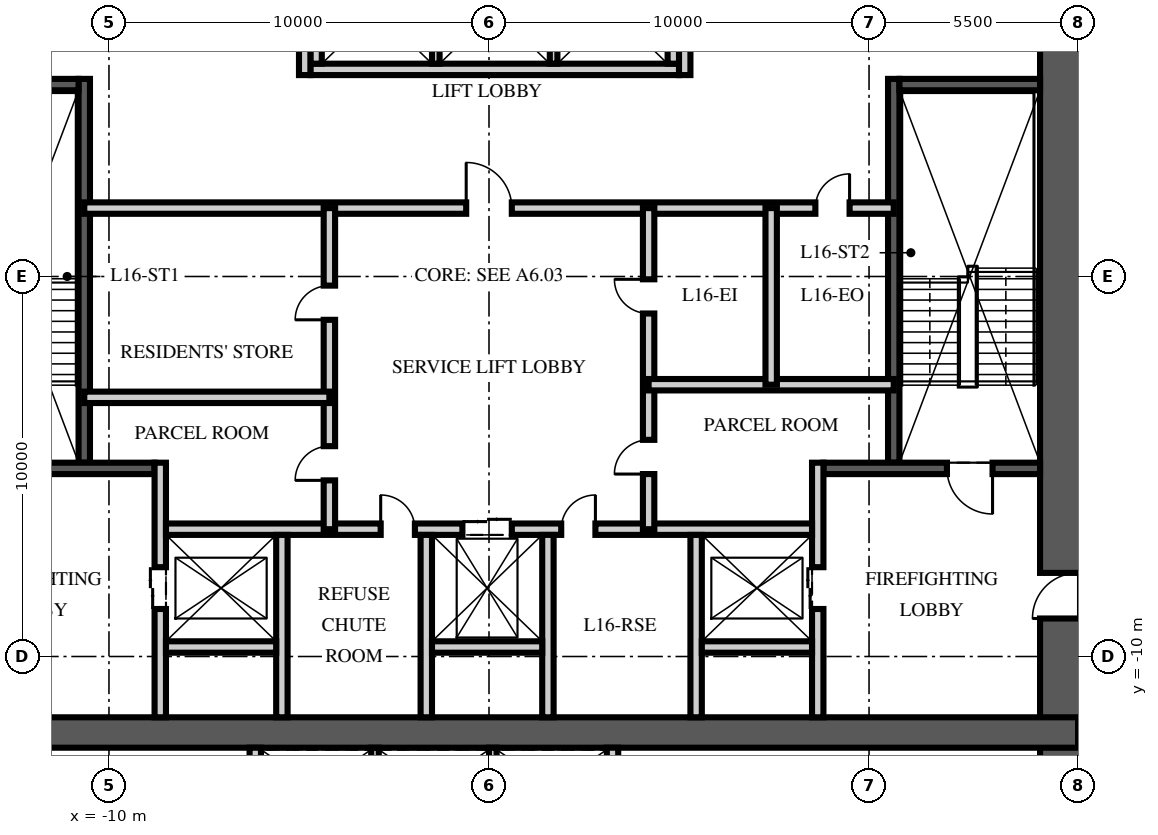
"""IFC4 building model, lengths in metres.
Left out: names, types, materials, properties, quantities, classifications, styles, units other than length and angle.
Written with IfcOpenShell. Run it as: python <this file> out.ifc"""

import sys

from ifc_helpers import new_model, si_unit, direction, frame, frame_2d, origin, place, context, subcontext, project, spatial, rectangle, extrude, element, fill, save


model = new_model("IFC4")
c1 = context("Model", 3, precision=1e-05, world=origin(), true_north=direction((0.0, 1.0)))
c2 = subcontext(c1, "Body", "Model", "MODEL_VIEW")
j1 = project(units=[si_unit("LENGTHUNIT", "METRE"), si_unit("PLANEANGLEUNIT", "RADIAN")], contexts=[c1])
p1 = place(None, origin())
s1 = spatial("IfcSite", under=j1, at=p1, CompositionType="ELEMENT")
p2 = place(p1, origin())
s2 = spatial("IfcBuilding", under=s1, at=p2, CompositionType="ELEMENT")
p3 = place(p2, frame((0.0, 0.0, 66.0)))
s3 = spatial("IfcBuildingStorey", under=s2, at=p3, CompositionType="ELEMENT", Elevation=66.0)
p4 = place(p3, frame((15.5, -15.5, -0.25), z_axis=(0.0, 0.0, 1.0), x_axis=(0.0, 1.0, 0.0)))
e1 = element("IfcWall", 1, at=p4, inside=s3, PredefinedType="SHEAR", context=c2, shape_type="SweptSolid", body=[
    extrude(rectangle(XDim=31.0, YDim=2.0, at=frame_2d((15.5, 0.0))), origin(), (0.0, 0.0, 1.0), 3.75),
])
p5 = place(p4, frame((6.5, 0.0, 0.25)))
e2 = element("IfcOpeningElement", 2, at=p5, cuts=e1, PredefinedType="OPENING", context=c2, shape_type="SweptSolid", body=[
    extrude(rectangle(XDim=1.2, YDim=2.1, at=frame_2d((0.6, 1.05))), frame((0.0, 1.01, 0.0), z_axis=(0.0, -1.0, 0.0), x_axis=(1.0, 0.0, 0.0)), (0.0, 0.0, 1.0), 2.02),
])
p6 = place(p4, frame((23.0, 0.0, 0.25)))
e3 = element("IfcOpeningElement", 3, at=p6, cuts=e1, PredefinedType="OPENING", context=c2, shape_type="SweptSolid", body=[
    extrude(rectangle(XDim=1.8, YDim=2.1, at=frame_2d((0.9, 1.05))), frame((0.0, 1.01, 0.0), z_axis=(0.0, -1.0, 0.0), x_axis=(1.0, 0.0, 0.0)), (0.0, 0.0, 1.0), 2.02),
])
p7 = place(p3, frame((-15.5, -12.0, -0.25), z_axis=(0.0, 0.0, 1.0), x_axis=(1.0, 0.0, 0.0)))
e4 = element("IfcWall", 4, at=p7, inside=s3, PredefinedType="SHEAR", context=c2, shape_type="SweptSolid", body=[
    extrude(rectangle(XDim=31.0, YDim=0.8, at=frame_2d((15.5, 0.0))), origin(), (0.0, 0.0, 1.0), 3.75),
])
p8 = place(p3, frame((-10.65, -4.9, 0.0), z_axis=(0.0, 0.0, 1.0), x_axis=(0.0, 1.0, 0.0)))
e5 = element("IfcWall", 5, at=p8, inside=s3, PredefinedType="SOLIDWALL", context=c2, shape_type="SweptSolid", body=[
    extrude(rectangle(XDim=10.1, YDim=0.3, at=frame_2d((5.05, 0.0))), origin(), (0.0, 0.0, 1.0), 3.5),
])
p9 = place(p3, frame((-14.5, -5.05, 0.0), z_axis=(0.0, 0.0, 1.0), x_axis=(1.0, 0.0, 0.0)))
e6 = element("IfcWall", 6, at=p9, inside=s3, PredefinedType="SOLIDWALL", context=c2, shape_type="SweptSolid", body=[
    extrude(rectangle(XDim=5.7, YDim=0.3, at=frame_2d((2.85, 0.0))), origin(), (0.0, 0.0, 1.0), 3.5),
])
p10 = place(p9, frame((1.25, 0.0, 0.0)))
e7 = element("IfcOpeningElement", 7, at=p10, cuts=e6, PredefinedType="OPENING", context=c2, shape_type="SweptSolid", body=[
    extrude(rectangle(XDim=1.2, YDim=2.1, at=frame_2d((0.6, 1.05))), frame((0.0, 0.16, 0.0), z_axis=(0.0, -1.0, 0.0), x_axis=(1.0, 0.0, 0.0)), (0.0, 0.0, 1.0), 0.32),
])
p11 = place(p3, frame((-14.5, 5.05, 0.0), z_axis=(0.0, 0.0, 1.0), x_axis=(1.0, 0.0, 0.0)))
e8 = element("IfcWall", 8, at=p11, inside=s3, PredefinedType="SOLIDWALL", context=c2, shape_type="SweptSolid", body=[
    extrude(rectangle(XDim=3.7, YDim=0.3, at=frame_2d((1.85, 0.0))), origin(), (0.0, 0.0, 1.0), 3.5),
])
p12 = place(p3, frame((-8.65, -11.6, 0.0), z_axis=(0.0, 0.0, 1.0), x_axis=(0.0, 1.0, 0.0)))
e9 = element("IfcWall", 9, at=p12, inside=s3, PredefinedType="PARTITIONING", context=c2, shape_type="SweptSolid", body=[
    extrude(rectangle(XDim=6.7, YDim=0.3, at=frame_2d((3.35, 0.0))), origin(), (0.0, 0.0, 1.0), 3.5),
])
p13 = place(p12, frame((2.85, 0.0, 0.0)))
e10 = element("IfcOpeningElement", 10, at=p13, cuts=e9, PredefinedType="OPENING", context=c2, shape_type="SweptSolid", body=[
    extrude(rectangle(XDim=1.1, YDim=2.1, at=frame_2d((0.55, 1.05))), frame((0.0, 0.16, 0.0), z_axis=(0.0, -1.0, 0.0), x_axis=(1.0, 0.0, 0.0)), (0.0, 0.0, 1.0), 0.32),
])
p14 = place(p3, frame((10.65, -4.9, 0.0), z_axis=(0.0, 0.0, 1.0), x_axis=(0.0, 1.0, 0.0)))
e11 = element("IfcWall", 11, at=p14, inside=s3, PredefinedType="SOLIDWALL", context=c2, shape_type="SweptSolid", body=[
    extrude(rectangle(XDim=10.1, YDim=0.3, at=frame_2d((5.05, 0.0))), origin(), (0.0, 0.0, 1.0), 3.5),
])
p15 = place(p3, frame((14.5, -5.05, 0.0), z_axis=(0.0, 0.0, 1.0), x_axis=(-1.0, 0.0, 0.0)))
e12 = element("IfcWall", 12, at=p15, inside=s3, PredefinedType="SOLIDWALL", context=c2, shape_type="SweptSolid", body=[
    extrude(rectangle(XDim=5.7, YDim=0.3, at=frame_2d((2.85, 0.0))), origin(), (0.0, 0.0, 1.0), 3.5),
])
p16 = place(p15, frame((1.25, 0.0, 0.0)))
e13 = element("IfcOpeningElement", 13, at=p16, cuts=e12, PredefinedType="OPENING", context=c2, shape_type="SweptSolid", body=[
    extrude(rectangle(XDim=1.2, YDim=2.1, at=frame_2d((0.6, 1.05))), frame((0.0, 0.16, 0.0), z_axis=(0.0, -1.0, 0.0), x_axis=(1.0, 0.0, 0.0)), (0.0, 0.0, 1.0), 0.32),
])
p17 = place(p3, frame((14.5, 5.05, 0.0), z_axis=(0.0, 0.0, 1.0), x_axis=(-1.0, 0.0, 0.0)))
e14 = element("IfcWall", 14, at=p17, inside=s3, PredefinedType="SOLIDWALL", context=c2, shape_type="SweptSolid", body=[
    extrude(rectangle(XDim=3.7, YDim=0.3, at=frame_2d((1.85, 0.0))), origin(), (0.0, 0.0, 1.0), 3.5),
])
p18 = place(p3, frame((8.65, -11.6, 0.0), z_axis=(0.0, 0.0, 1.0), x_axis=(0.0, 1.0, 0.0)))
e15 = element("IfcWall", 15, at=p18, inside=s3, PredefinedType="PARTITIONING", context=c2, shape_type="SweptSolid", body=[
    extrude(rectangle(XDim=6.7, YDim=0.3, at=frame_2d((3.35, 0.0))), origin(), (0.0, 0.0, 1.0), 3.5),
])
p19 = place(p18, frame((2.85, 0.0, 0.0)))
e16 = element("IfcOpeningElement", 16, at=p19, cuts=e15, PredefinedType="OPENING", context=c2, shape_type="SweptSolid", body=[
    extrude(rectangle(XDim=1.1, YDim=2.1, at=frame_2d((0.55, 1.05))), frame((0.0, 0.16, 0.0), z_axis=(0.0, -1.0, 0.0), x_axis=(1.0, 0.0, 0.0)), (0.0, 0.0, 1.0), 0.32),
])
p20 = place(p3, frame((-8.5, -6.65, 0.0), z_axis=(0.0, 0.0, 1.0), x_axis=(1.0, 0.0, 0.0)))
e17 = element("IfcWall", 17, at=p20, inside=s3, PredefinedType="PARTITIONING", context=c2, shape_type="SweptSolid", body=[
    extrude(rectangle(XDim=17.0, YDim=0.3, at=frame_2d((8.5, 0.0))), origin(), (0.0, 0.0, 1.0), 3.5),
])
p21 = place(p20, frame((7.8, 0.0, 0.0)))
e18 = element("IfcOpeningElement", 18, at=p21, cuts=e17, PredefinedType="OPENING", context=c2, shape_type="SweptSolid", body=[
    extrude(rectangle(XDim=1.3, YDim=2.4, at=frame_2d((0.65, 1.2))), frame((0.0, 0.16, 0.0), z_axis=(0.0, -1.0, 0.0), x_axis=(1.0, 0.0, 0.0)), (0.0, 0.0, 1.0), 0.32),
])
p22 = place(p20, frame((5.65, 0.0, 0.0)))
e19 = element("IfcOpeningElement", 19, at=p22, cuts=e17, PredefinedType="OPENING", context=c2, shape_type="SweptSolid", body=[
    extrude(rectangle(XDim=0.9, YDim=2.1, at=frame_2d((0.45, 1.05))), frame((0.0, 0.16, 0.0), z_axis=(0.0, -1.0, 0.0), x_axis=(1.0, 0.0, 0.0)), (0.0, 0.0, 1.0), 0.32),
])
p23 = place(p20, frame((10.4, 0.0, 0.0)))
e20 = element("IfcOpeningElement", 20, at=p23, cuts=e17, PredefinedType="OPENING", context=c2, shape_type="SweptSolid", body=[
    extrude(rectangle(XDim=0.9, YDim=2.1, at=frame_2d((0.45, 1.05))), frame((0.0, 0.16, 0.0), z_axis=(0.0, -1.0, 0.0), x_axis=(1.0, 0.0, 0.0)), (0.0, 0.0, 1.0), 0.32),
])
for number, where, z_axis, x_axis in (
    (21, (-5.45, -11.6, 0.0), (0.0, 0.0, 1.0), (0.0, 1.0, 0.0)),
    (22, (-1.65, -11.6, 0.0), (0.0, 0.0, 1.0), (0.0, 1.0, 0.0)),
    (23, (1.55, -11.6, 0.0), (0.0, 0.0, 1.0), (0.0, 1.0, 0.0)),
    (24, (5.45, -11.6, 0.0), (0.0, 0.0, 1.0), (0.0, 1.0, 0.0)),
):
    element("IfcWall", number, at=place(p3, frame(where, z_axis=z_axis, x_axis=x_axis)), inside=s3, PredefinedType="PARTITIONING", context=c2, shape_type="SweptSolid", body=[
        extrude(rectangle(XDim=4.8, YDim=0.3, at=frame_2d((2.4, 0.0))), origin(), (0.0, 0.0, 1.0), 3.5),
    ])
for number, where, z_axis, x_axis in (
    (25, (-8.5, -9.75, 0.0), (0.0, 0.0, 1.0), (1.0, 0.0, 0.0)),
    (26, (-1.5, -9.75, 0.0), (0.0, 0.0, 1.0), (1.0, 0.0, 0.0)),
    (27, (5.6, -9.75, 0.0), (0.0, 0.0, 1.0), (1.0, 0.0, 0.0)),
):
    element("IfcWall", number, at=place(p3, frame(where, z_axis=z_axis, x_axis=x_axis)), inside=s3, PredefinedType="PARTITIONING", context=c2, shape_type="SweptSolid", body=[
        extrude(rectangle(XDim=2.9, YDim=0.3, at=frame_2d((1.45, 0.0))), origin(), (0.0, 0.0, 1.0), 3.5),
    ])
p24 = place(p3, frame((-4.7, 5.45, 0.0), z_axis=(0.0, 0.0, 1.0), x_axis=(1.0, 0.0, 0.0)))
e28 = element("IfcWall", 28, at=p24, inside=s3, PredefinedType="PARTITIONING", context=c2, shape_type="SweptSolid", body=[
    extrude(rectangle(XDim=9.7, YDim=0.3, at=frame_2d((4.85, 0.0))), origin(), (0.0, 0.0, 1.0), 3.5),
])
for number, where, z_axis, x_axis in (
    (29, (-4.55, 5.6, 0.0), (0.0, 0.0, 1.0), (0.0, 1.0, 0.0)),
    (30, (4.85, 5.6, 0.0), (0.0, 0.0, 1.0), (0.0, 1.0, 0.0)),
):
    element("IfcWall", number, at=place(p3, frame(where, z_axis=z_axis, x_axis=x_axis)), inside=s3, PredefinedType="PARTITIONING", context=c2, shape_type="SweptSolid", body=[
        extrude(rectangle(XDim=2.8, YDim=0.3, at=frame_2d((1.4, 0.0))), origin(), (0.0, 0.0, 1.0), 3.5),
    ])
for number, where, z_axis, x_axis in (
    (31, (-1.4, 5.6, 0.0), (0.0, 0.0, 1.0), (0.0, 1.0, 0.0)),
    (32, (1.7, 5.6, 0.0), (0.0, 0.0, 1.0), (0.0, 1.0, 0.0)),
):
    element("IfcWall", number, at=place(p3, frame(where, z_axis=z_axis, x_axis=x_axis)), inside=s3, PredefinedType="PARTITIONING", context=c2, shape_type="SweptSolid", body=[
        extrude(rectangle(XDim=2.8, YDim=0.2, at=frame_2d((1.4, 0.0))), origin(), (0.0, 0.0, 1.0), 3.5),
    ])
for number, where, z_axis, x_axis in (
    (33, (-6.15, -14.5, 0.0), (0.0, 0.0, 1.0), (0.0, 1.0, 0.0)),
    (34, (3.25, -14.5, 0.0), (0.0, 0.0, 1.0), (0.0, 1.0, 0.0)),
):
    element("IfcWall", number, at=place(p3, frame(where, z_axis=z_axis, x_axis=x_axis)), inside=s3, PredefinedType="PARTITIONING", context=c2, shape_type="SweptSolid", body=[
        extrude(rectangle(XDim=2.1, YDim=0.3, at=frame_2d((1.05, 0.0))), origin(), (0.0, 0.0, 1.0), 3.5),
    ])
for number, where, z_axis, x_axis in (
    (35, (-3.0, -14.5, 0.0), (0.0, 0.0, 1.0), (0.0, 1.0, 0.0)),
    (36, (0.1, -14.5, 0.0), (0.0, 0.0, 1.0), (0.0, 1.0, 0.0)),
):
    element("IfcWall", number, at=place(p3, frame(where, z_axis=z_axis, x_axis=x_axis)), inside=s3, PredefinedType="PARTITIONING", context=c2, shape_type="SweptSolid", body=[
        extrude(rectangle(XDim=2.1, YDim=0.2, at=frame_2d((1.05, 0.0))), origin(), (0.0, 0.0, 1.0), 3.5),
    ])
p25 = place(p3, frame((-10.65, 1.8, 0.0), z_axis=(0.0, 0.0, 1.0), x_axis=(1.0, 0.0, 0.0)))
e37 = element("IfcWall", 37, at=p25, inside=s3, PredefinedType="PARTITIONING", context=c2, shape_type="SweptSolid", body=[
    extrude(rectangle(XDim=21.3, YDim=0.3, at=frame_2d((10.65, 0.0))), origin(), (0.0, 0.0, 1.0), 3.5),
])
p26 = place(p25, frame((10.05, 0.0, 0.0)))
e38 = element("IfcOpeningElement", 38, at=p26, cuts=e37, PredefinedType="OPENING", context=c2, shape_type="SweptSolid", body=[
    extrude(rectangle(XDim=1.2, YDim=2.1, at=frame_2d((0.6, 1.05))), frame((0.0, 0.16, 0.0), z_axis=(0.0, -1.0, 0.0), x_axis=(1.0, 0.0, 0.0)), (0.0, 0.0, 1.0), 0.32),
])
p27 = place(p25, frame((19.238, 0.0, 0.0)))
e39 = element("IfcOpeningElement", 39, at=p27, cuts=e37, PredefinedType="OPENING", context=c2, shape_type="SweptSolid", body=[
    extrude(rectangle(XDim=0.9, YDim=2.1, at=frame_2d((0.45, 1.05))), frame((0.0, 0.16, 0.0), z_axis=(0.0, -1.0, 0.0), x_axis=(1.0, 0.0, 0.0)), (0.0, 0.0, 1.0), 0.32),
])
p28 = place(p3, frame((-4.2, -6.65, 0.0), z_axis=(0.0, 0.0, 1.0), x_axis=(0.0, 1.0, 0.0)))
e40 = element("IfcWall", 40, at=p28, inside=s3, PredefinedType="PARTITIONING", context=c2, shape_type="SweptSolid", body=[
    extrude(rectangle(XDim=8.45, YDim=0.3, at=frame_2d((4.225, 0.0))), origin(), (0.0, 0.0, 1.0), 3.5),
])
p29 = place(p28, frame((1.285, 0.0, 0.0)))
e41 = element("IfcOpeningElement", 41, at=p29, cuts=e40, PredefinedType="OPENING", context=c2, shape_type="SweptSolid", body=[
    extrude(rectangle(XDim=0.9, YDim=2.1, at=frame_2d((0.45, 1.05))), frame((0.0, 0.16, 0.0), z_axis=(0.0, -1.0, 0.0), x_axis=(1.0, 0.0, 0.0)), (0.0, 0.0, 1.0), 0.32),
])
p30 = place(p28, frame((5.51, 0.0, 0.0)))
e42 = element("IfcOpeningElement", 42, at=p30, cuts=e40, PredefinedType="OPENING", context=c2, shape_type="SweptSolid", body=[
    extrude(rectangle(XDim=0.9, YDim=2.1, at=frame_2d((0.45, 1.05))), frame((0.0, 0.16, 0.0), z_axis=(0.0, -1.0, 0.0), x_axis=(1.0, 0.0, 0.0)), (0.0, 0.0, 1.0), 0.32),
])
p31 = place(p3, frame((4.2, -6.65, 0.0), z_axis=(0.0, 0.0, 1.0), x_axis=(0.0, 1.0, 0.0)))
e43 = element("IfcWall", 43, at=p31, inside=s3, PredefinedType="PARTITIONING", context=c2, shape_type="SweptSolid", body=[
    extrude(rectangle(XDim=8.45, YDim=0.3, at=frame_2d((4.225, 0.0))), origin(), (0.0, 0.0, 1.0), 3.5),
])
p32 = place(p31, frame((1.451, 0.0, 0.0)))
e44 = element("IfcOpeningElement", 44, at=p32, cuts=e43, PredefinedType="OPENING", context=c2, shape_type="SweptSolid", body=[
    extrude(rectangle(XDim=0.9, YDim=2.1, at=frame_2d((0.45, 1.05))), frame((0.0, 0.16, 0.0), z_axis=(0.0, -1.0, 0.0), x_axis=(1.0, 0.0, 0.0)), (0.0, 0.0, 1.0), 0.32),
])
p33 = place(p31, frame((5.676, 0.0, 0.0)))
e45 = element("IfcOpeningElement", 45, at=p33, cuts=e43, PredefinedType="OPENING", context=c2, shape_type="SweptSolid", body=[
    extrude(rectangle(XDim=0.9, YDim=2.1, at=frame_2d((0.45, 1.05))), frame((0.0, 0.16, 0.0), z_axis=(0.0, -1.0, 0.0), x_axis=(1.0, 0.0, 0.0)), (0.0, 0.0, 1.0), 0.32),
])
for number, where, z_axis, x_axis in (
    (46, (-10.65, -3.18, 0.0), (0.0, 0.0, 1.0), (1.0, 0.0, 0.0)),
    (47, (10.65, -2.848, 0.0), (0.0, 0.0, 1.0), (-1.0, 0.0, 0.0)),
):
    element("IfcWall", number, at=place(p3, frame(where, z_axis=z_axis, x_axis=x_axis)), inside=s3, PredefinedType="PARTITIONING", context=c2, shape_type="SweptSolid", body=[
        extrude(rectangle(XDim=6.45, YDim=0.3, at=frame_2d((3.225, 0.0))), origin(), (0.0, 0.0, 1.0), 3.5),
    ])
p34 = place(p3, frame((7.425, -2.848, 0.0), z_axis=(0.0, 0.0, 1.0), x_axis=(0.0, 1.0, 0.0)))
e48 = element("IfcWall", 48, at=p34, inside=s3, PredefinedType="PARTITIONING", context=c2, shape_type="SweptSolid", body=[
    extrude(rectangle(XDim=4.648, YDim=0.3, at=frame_2d((2.324, 0.0))), origin(), (0.0, 0.0, 1.0), 3.5),
])
p35 = place(p3, frame((-4.85, 5.3, 0.0), z_axis=(0.0, 0.0, 1.0), x_axis=(0.0, 1.0, 0.0)))
e49 = element("IfcWall", 49, at=p35, inside=s3, PredefinedType="PARTITIONING", context=c2, shape_type="SweptSolid", body=[
    extrude(rectangle(XDim=6.3, YDim=0.3, at=frame_2d((3.15, 0.0))), origin(), (0.0, 0.0, 1.0), 3.5),
])
p36 = place(p35, frame((4.35, 0.0, 0.0)))
e50 = element("IfcOpeningElement", 50, at=p36, cuts=e49, PredefinedType="OPENING", context=c2, shape_type="SweptSolid", body=[
    extrude(rectangle(XDim=0.9, YDim=2.1, at=frame_2d((0.45, 1.05))), frame((0.0, 0.16, 0.0), z_axis=(0.0, -1.0, 0.0), x_axis=(1.0, 0.0, 0.0)), (0.0, 0.0, 1.0), 0.32),
])
p37 = place(p3, frame((5.15, 5.3, 0.0), z_axis=(0.0, 0.0, 1.0), x_axis=(0.0, 1.0, 0.0)))
e51 = element("IfcWall", 51, at=p37, inside=s3, PredefinedType="PARTITIONING", context=c2, shape_type="SweptSolid", body=[
    extrude(rectangle(XDim=6.3, YDim=0.3, at=frame_2d((3.15, 0.0))), origin(), (0.0, 0.0, 1.0), 3.5),
])
p38 = place(p37, frame((4.35, 0.0, 0.0)))
e52 = element("IfcOpeningElement", 52, at=p38, cuts=e51, PredefinedType="OPENING", context=c2, shape_type="SweptSolid", body=[
    extrude(rectangle(XDim=0.9, YDim=2.1, at=frame_2d((0.45, 1.05))), frame((0.0, 0.16, 0.0), z_axis=(0.0, -1.0, 0.0), x_axis=(1.0, 0.0, 0.0)), (0.0, 0.0, 1.0), 0.32),
])
p39 = place(p16, origin())
e53 = element("IfcDoor", 53, at=p39, inside=s3, OperationType="SINGLE_SWING_LEFT", PredefinedType="DOOR", context=c2, shape_type="SweptSolid", body=[
    extrude(rectangle(XDim=1.2, YDim=2.1, at=frame_2d((0.6, 1.05))), frame((0.0, 0.025, 0.0), z_axis=(0.0, -1.0, 0.0), x_axis=(1.0, 0.0, 0.0)), (0.0, 0.0, 1.0), 0.05),
])
fill(e13, e53)
p40 = place(p5, origin())
e54 = element("IfcDoor", 54, at=p40, inside=s3, OperationType="SINGLE_SWING_LEFT", PredefinedType="DOOR", context=c2, shape_type="SweptSolid", body=[
    extrude(rectangle(XDim=1.2, YDim=2.1, at=frame_2d((0.6, 1.05))), frame((0.0, 0.025, 0.0), z_axis=(0.0, -1.0, 0.0), x_axis=(1.0, 0.0, 0.0)), (0.0, 0.0, 1.0), 0.05),
])
fill(e2, e54)
p41 = place(p13, origin())
e55 = element("IfcDoor", 55, at=p41, inside=s3, OperationType="DOUBLE_DOOR_SLIDING", PredefinedType="DOOR", context=c2, shape_type="SweptSolid", body=[
    extrude(rectangle(XDim=1.1, YDim=2.1, at=frame_2d((0.55, 1.05))), frame((0.0, 0.025, 0.0), z_axis=(0.0, -1.0, 0.0), x_axis=(1.0, 0.0, 0.0)), (0.0, 0.0, 1.0), 0.05),
])
fill(e10, e55)
p42 = place(p19, origin())
e56 = element("IfcDoor", 56, at=p42, inside=s3, OperationType="DOUBLE_DOOR_SLIDING", PredefinedType="DOOR", context=c2, shape_type="SweptSolid", body=[
    extrude(rectangle(XDim=1.1, YDim=2.1, at=frame_2d((0.55, 1.05))), frame((0.0, 0.025, 0.0), z_axis=(0.0, -1.0, 0.0), x_axis=(1.0, 0.0, 0.0)), (0.0, 0.0, 1.0), 0.05),
])
fill(e16, e56)
p43 = place(p21, origin())
e57 = element("IfcDoor", 57, at=p43, inside=s3, OperationType="DOUBLE_DOOR_SLIDING", PredefinedType="DOOR", context=c2, shape_type="SweptSolid", body=[
    extrude(rectangle(XDim=1.3, YDim=2.4, at=frame_2d((0.65, 1.2))), frame((0.0, 0.025, 0.0), z_axis=(0.0, -1.0, 0.0), x_axis=(1.0, 0.0, 0.0)), (0.0, 0.0, 1.0), 0.05),
])
fill(e18, e57)
p44 = place(p26, origin())
e58 = element("IfcDoor", 58, at=p44, inside=s3, OperationType="SINGLE_SWING_LEFT", PredefinedType="DOOR", context=c2, shape_type="SweptSolid", body=[
    extrude(rectangle(XDim=1.2, YDim=2.1, at=frame_2d((0.6, 1.05))), frame((0.0, 0.025, 0.0), z_axis=(0.0, -1.0, 0.0), x_axis=(1.0, 0.0, 0.0)), (0.0, 0.0, 1.0), 0.05),
])
fill(e38, e58)
p45 = place(p22, origin())
e59 = element("IfcDoor", 59, at=p45, inside=s3, OperationType="SINGLE_SWING_LEFT", PredefinedType="DOOR", context=c2, shape_type="SweptSolid", body=[
    extrude(rectangle(XDim=0.9, YDim=2.1, at=frame_2d((0.45, 1.05))), frame((0.0, 0.025, 0.0), z_axis=(0.0, -1.0, 0.0), x_axis=(1.0, 0.0, 0.0)), (0.0, 0.0, 1.0), 0.05),
])
fill(e19, e59)
p46 = place(p23, origin())
e60 = element("IfcDoor", 60, at=p46, inside=s3, OperationType="SINGLE_SWING_RIGHT", PredefinedType="DOOR", context=c2, shape_type="SweptSolid", body=[
    extrude(rectangle(XDim=0.9, YDim=2.1, at=frame_2d((0.45, 1.05))), frame((0.0, 0.025, 0.0), z_axis=(0.0, -1.0, 0.0), x_axis=(1.0, 0.0, 0.0)), (0.0, 0.0, 1.0), 0.05),
])
fill(e20, e60)
p47 = place(p29, origin())
e61 = element("IfcDoor", 61, at=p47, inside=s3, OperationType="SINGLE_SWING_LEFT", PredefinedType="DOOR", context=c2, shape_type="SweptSolid", body=[
    extrude(rectangle(XDim=0.9, YDim=2.1, at=frame_2d((0.45, 1.05))), frame((0.0, 0.025, 0.0), z_axis=(0.0, -1.0, 0.0), x_axis=(1.0, 0.0, 0.0)), (0.0, 0.0, 1.0), 0.05),
])
fill(e41, e61)
p48 = place(p30, origin())
e62 = element("IfcDoor", 62, at=p48, inside=s3, OperationType="SINGLE_SWING_LEFT", PredefinedType="DOOR", context=c2, shape_type="SweptSolid", body=[
    extrude(rectangle(XDim=0.9, YDim=2.1, at=frame_2d((0.45, 1.05))), frame((0.0, 0.025, 0.0), z_axis=(0.0, -1.0, 0.0), x_axis=(1.0, 0.0, 0.0)), (0.0, 0.0, 1.0), 0.05),
])
fill(e42, e62)
p49 = place(p32, origin())
e63 = element("IfcDoor", 63, at=p49, inside=s3, OperationType="SINGLE_SWING_LEFT", PredefinedType="DOOR", context=c2, shape_type="SweptSolid", body=[
    extrude(rectangle(XDim=0.9, YDim=2.1, at=frame_2d((0.45, 1.05))), frame((0.0, 0.025, 0.0), z_axis=(0.0, -1.0, 0.0), x_axis=(1.0, 0.0, 0.0)), (0.0, 0.0, 1.0), 0.05),
])
fill(e44, e63)
p50 = place(p33, origin())
e64 = element("IfcDoor", 64, at=p50, inside=s3, OperationType="SINGLE_SWING_RIGHT", PredefinedType="DOOR", context=c2, shape_type="SweptSolid", body=[
    extrude(rectangle(XDim=0.9, YDim=2.1, at=frame_2d((0.45, 1.05))), frame((0.0, 0.025, 0.0), z_axis=(0.0, -1.0, 0.0), x_axis=(1.0, 0.0, 0.0)), (0.0, 0.0, 1.0), 0.05),
])
fill(e45, e64)
p51 = place(p27, origin())
e65 = element("IfcDoor", 65, at=p51, inside=s3, OperationType="SINGLE_SWING_RIGHT", PredefinedType="DOOR", context=c2, shape_type="SweptSolid", body=[
    extrude(rectangle(XDim=0.9, YDim=2.1, at=frame_2d((0.45, 1.05))), frame((0.0, 0.025, 0.0), z_axis=(0.0, -1.0, 0.0), x_axis=(1.0, 0.0, 0.0)), (0.0, 0.0, 1.0), 0.05),
])
fill(e39, e65)
save(model, sys.argv[1])
